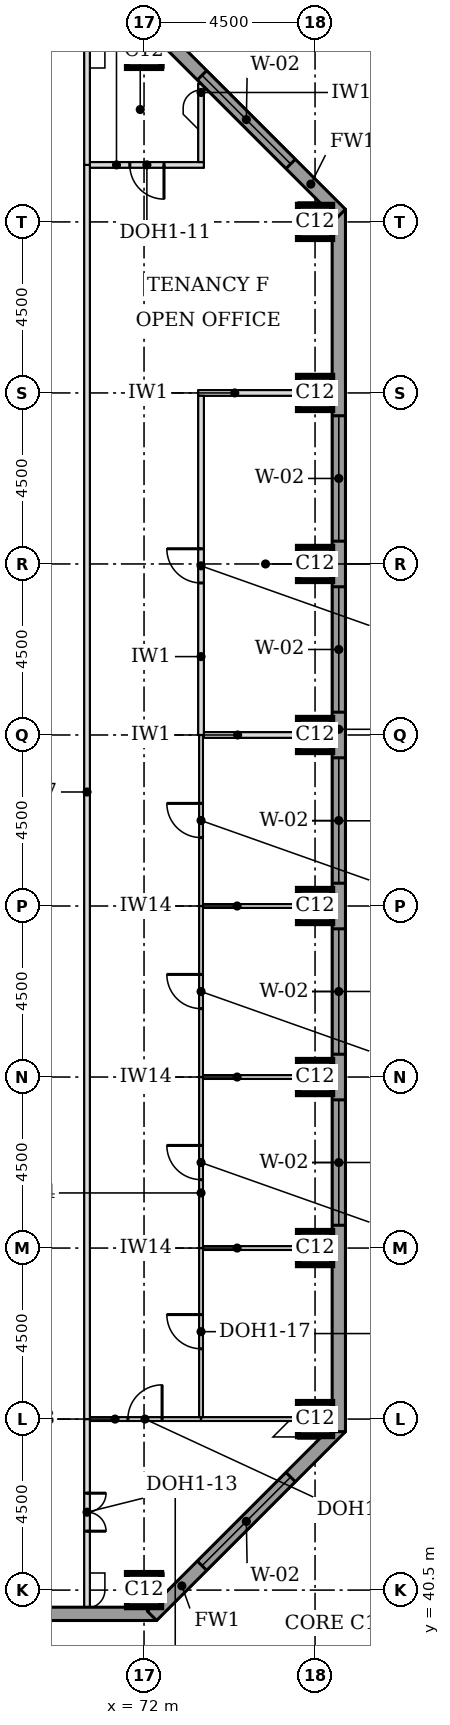
"""IFC4 building model, lengths in metres.
Left out: names, types, materials, properties, quantities, classifications, styles, units other than length and angle.
Written with IfcOpenShell. Run it as: python <this file> out.ifc"""

import sys

from ifc_helpers import new_model, si_unit, direction, frame, frame_2d, origin, origin_2d, place, context, subcontext, project, spatial, rectangle, extrude, element, fill, save


model = new_model("IFC4")
c1 = context("Model", 3, precision=1e-05, world=origin(), true_north=direction((0.0, 1.0)))
c2 = subcontext(c1, "Body", "Model", "MODEL_VIEW")
j1 = project(units=[si_unit("LENGTHUNIT", "METRE"), si_unit("PLANEANGLEUNIT", "RADIAN")], contexts=[c1])
p1 = place(None, origin())
s1 = spatial("IfcSite", under=j1, at=p1, CompositionType="ELEMENT")
p2 = place(p1, origin())
s2 = spatial("IfcBuilding", under=s1, at=p2, CompositionType="ELEMENT")
p3 = place(p2, frame((0.0, 0.0, 147.7)))
s3 = spatial("IfcBuildingStorey", under=s2, at=p3, CompositionType="ELEMENT", Elevation=147.7)
for number, where, z_axis, x_axis in (
    (1, (72.0, 40.5, 0.0), (0.0, 0.0, 1.0), (1.0, 0.0, 0.0)),
    (2, (76.5, 45.0, 0.0), (0.0, 0.0, 1.0), (1.0, 0.0, 0.0)),
    (3, (76.5, 49.5, 0.0), (0.0, 0.0, 1.0), (1.0, 0.0, 0.0)),
    (4, (76.5, 54.0, 0.0), (0.0, 0.0, 1.0), (1.0, 0.0, 0.0)),
    (5, (76.5, 58.5, 0.0), (0.0, 0.0, 1.0), (1.0, 0.0, 0.0)),
    (6, (76.5, 63.0, 0.0), (0.0, 0.0, 1.0), (1.0, 0.0, 0.0)),
    (7, (76.5, 67.5, 0.0), (0.0, 0.0, 1.0), (1.0, 0.0, 0.0)),
    (8, (76.5, 72.0, 0.0), (0.0, 0.0, 1.0), (1.0, 0.0, 0.0)),
    (9, (76.5, 76.5, 0.0), (0.0, 0.0, 1.0), (1.0, 0.0, 0.0)),
    (10, (72.0, 81.0, 0.0), (0.0, 0.0, 1.0), (1.0, 0.0, 0.0)),
):
    element("IfcColumn", number, at=place(p3, frame(where, z_axis=z_axis, x_axis=x_axis)), inside=s3, PredefinedType="COLUMN", context=c2, shape_type="SweptSolid", body=[
        extrude(rectangle(XDim=0.9, YDim=0.9, at=origin_2d()), origin(), (0.0, 0.0, 1.0), 3.7),
    ])
p4 = place(p3, frame((36.0, 39.875, 0.0), z_axis=(0.0, 0.0, 1.0), x_axis=(1.0, 0.0, 0.0)))
e11 = element("IfcWall", 11, at=p4, inside=s3, PredefinedType="STANDARD", context=c2, shape_type="SweptSolid", body=[
    extrude(rectangle(XDim=36.331, YDim=0.35, at=frame_2d((18.166, 0.0))), origin(), (0.0, 0.0, 1.0), 3.525),
])
p5 = place(p4, frame((5.1, 0.0, 0.9)))
e12 = element("IfcOpeningElement", 12, at=p5, cuts=e11, PredefinedType="OPENING", context=c2, shape_type="SweptSolid", body=[
    extrude(rectangle(XDim=3.3, YDim=1.9, at=frame_2d((1.65, 0.95))), frame((0.0, 0.185, 0.0), z_axis=(0.0, -1.0, 0.0), x_axis=(1.0, 0.0, 0.0)), (0.0, 0.0, 1.0), 0.37),
])
p6 = place(p4, frame((9.6, 0.0, 0.9)))
e13 = element("IfcOpeningElement", 13, at=p6, cuts=e11, PredefinedType="OPENING", context=c2, shape_type="SweptSolid", body=[
    extrude(rectangle(XDim=3.3, YDim=1.9, at=frame_2d((1.65, 0.95))), frame((0.0, 0.185, 0.0), z_axis=(0.0, -1.0, 0.0), x_axis=(1.0, 0.0, 0.0)), (0.0, 0.0, 1.0), 0.37),
])
p7 = place(p4, frame((14.1, 0.0, 0.9)))
e14 = element("IfcOpeningElement", 14, at=p7, cuts=e11, PredefinedType="OPENING", context=c2, shape_type="SweptSolid", body=[
    extrude(rectangle(XDim=3.3, YDim=1.9, at=frame_2d((1.65, 0.95))), frame((0.0, 0.185, 0.0), z_axis=(0.0, -1.0, 0.0), x_axis=(1.0, 0.0, 0.0)), (0.0, 0.0, 1.0), 0.37),
])
p8 = place(p4, frame((18.6, 0.0, 0.9)))
e15 = element("IfcOpeningElement", 15, at=p8, cuts=e11, PredefinedType="OPENING", context=c2, shape_type="SweptSolid", body=[
    extrude(rectangle(XDim=3.3, YDim=1.9, at=frame_2d((1.65, 0.95))), frame((0.0, 0.185, 0.0), z_axis=(0.0, -1.0, 0.0), x_axis=(1.0, 0.0, 0.0)), (0.0, 0.0, 1.0), 0.37),
])
p9 = place(p4, frame((23.1, 0.0, 0.9)))
e16 = element("IfcOpeningElement", 16, at=p9, cuts=e11, PredefinedType="OPENING", context=c2, shape_type="SweptSolid", body=[
    extrude(rectangle(XDim=3.3, YDim=1.9, at=frame_2d((1.65, 0.95))), frame((0.0, 0.185, 0.0), z_axis=(0.0, -1.0, 0.0), x_axis=(1.0, 0.0, 0.0)), (0.0, 0.0, 1.0), 0.37),
])
p10 = place(p4, frame((27.6, 0.0, 0.9)))
e17 = element("IfcOpeningElement", 17, at=p10, cuts=e11, PredefinedType="OPENING", context=c2, shape_type="SweptSolid", body=[
    extrude(rectangle(XDim=3.3, YDim=1.9, at=frame_2d((1.65, 0.95))), frame((0.0, 0.185, 0.0), z_axis=(0.0, -1.0, 0.0), x_axis=(1.0, 0.0, 0.0)), (0.0, 0.0, 1.0), 0.37),
])
p11 = place(p3, frame((72.208, 39.824, 0.0), z_axis=(0.0, 0.0, 1.0), x_axis=(0.707106781187, 0.707106781187, 0.0)))
e18 = element("IfcWall", 18, at=p11, inside=s3, PredefinedType="STANDARD", context=c2, shape_type="SweptSolid", body=[
    extrude(rectangle(XDim=7.027, YDim=0.35, at=frame_2d((3.513, 0.0))), origin(), (0.0, 0.0, 1.0), 3.525),
])
p12 = place(p11, frame((1.863, 0.0, 0.9)))
e19 = element("IfcOpeningElement", 19, at=p12, cuts=e18, PredefinedType="OPENING", context=c2, shape_type="SweptSolid", body=[
    extrude(rectangle(XDim=3.3, YDim=1.9, at=frame_2d((1.65, 0.95))), frame((0.0, 0.185, 0.0), z_axis=(0.0, -1.0, 0.0), x_axis=(1.0, 0.0, 0.0)), (0.0, 0.0, 1.0), 0.37),
])
p13 = place(p3, frame((77.125, 44.669, 0.0), z_axis=(0.0, 0.0, 1.0), x_axis=(0.0, 1.0, 0.0)))
e20 = element("IfcWall", 20, at=p13, inside=s3, PredefinedType="STANDARD", context=c2, shape_type="SweptSolid", body=[
    extrude(rectangle(XDim=32.163, YDim=0.35, at=frame_2d((16.081, 0.0))), origin(), (0.0, 0.0, 1.0), 3.525),
])
p14 = place(p13, frame((5.431, 0.0, 0.9)))
e21 = element("IfcOpeningElement", 21, at=p14, cuts=e20, PredefinedType="OPENING", context=c2, shape_type="SweptSolid", body=[
    extrude(rectangle(XDim=3.3, YDim=1.9, at=frame_2d((1.65, 0.95))), frame((0.0, 0.185, 0.0), z_axis=(0.0, -1.0, 0.0), x_axis=(1.0, 0.0, 0.0)), (0.0, 0.0, 1.0), 0.37),
])
p15 = place(p13, frame((9.931, 0.0, 0.9)))
e22 = element("IfcOpeningElement", 22, at=p15, cuts=e20, PredefinedType="OPENING", context=c2, shape_type="SweptSolid", body=[
    extrude(rectangle(XDim=3.3, YDim=1.9, at=frame_2d((1.65, 0.95))), frame((0.0, 0.185, 0.0), z_axis=(0.0, -1.0, 0.0), x_axis=(1.0, 0.0, 0.0)), (0.0, 0.0, 1.0), 0.37),
])
p16 = place(p13, frame((14.431, 0.0, 0.9)))
e23 = element("IfcOpeningElement", 23, at=p16, cuts=e20, PredefinedType="OPENING", context=c2, shape_type="SweptSolid", body=[
    extrude(rectangle(XDim=3.3, YDim=1.9, at=frame_2d((1.65, 0.95))), frame((0.0, 0.185, 0.0), z_axis=(0.0, -1.0, 0.0), x_axis=(1.0, 0.0, 0.0)), (0.0, 0.0, 1.0), 0.37),
])
p17 = place(p13, frame((18.931, 0.0, 0.9)))
e24 = element("IfcOpeningElement", 24, at=p17, cuts=e20, PredefinedType="OPENING", context=c2, shape_type="SweptSolid", body=[
    extrude(rectangle(XDim=3.3, YDim=1.9, at=frame_2d((1.65, 0.95))), frame((0.0, 0.185, 0.0), z_axis=(0.0, -1.0, 0.0), x_axis=(1.0, 0.0, 0.0)), (0.0, 0.0, 1.0), 0.37),
])
p18 = place(p13, frame((23.431, 0.0, 0.9)))
e25 = element("IfcOpeningElement", 25, at=p18, cuts=e20, PredefinedType="OPENING", context=c2, shape_type="SweptSolid", body=[
    extrude(rectangle(XDim=3.3, YDim=1.9, at=frame_2d((1.65, 0.95))), frame((0.0, 0.185, 0.0), z_axis=(0.0, -1.0, 0.0), x_axis=(1.0, 0.0, 0.0)), (0.0, 0.0, 1.0), 0.37),
])
p19 = place(p3, frame((77.176, 76.708, 0.0), z_axis=(0.0, 0.0, 1.0), x_axis=(-0.707106781187, 0.707106781187, 0.0)))
e26 = element("IfcWall", 26, at=p19, inside=s3, PredefinedType="STANDARD", context=c2, shape_type="SweptSolid", body=[
    extrude(rectangle(XDim=7.027, YDim=0.35, at=frame_2d((3.513, 0.0))), origin(), (0.0, 0.0, 1.0), 3.525),
])
p20 = place(p19, frame((1.863, 0.0, 0.9)))
e27 = element("IfcOpeningElement", 27, at=p20, cuts=e26, PredefinedType="OPENING", context=c2, shape_type="SweptSolid", body=[
    extrude(rectangle(XDim=3.3, YDim=1.9, at=frame_2d((1.65, 0.95))), frame((0.0, 0.185, 0.0), z_axis=(0.0, -1.0, 0.0), x_axis=(1.0, 0.0, 0.0)), (0.0, 0.0, 1.0), 0.37),
])
p21 = place(p3, frame((70.575, 45.0, 0.0), z_axis=(0.0, 0.0, 1.0), x_axis=(1.0, 0.0, 0.0)))
e28 = element("IfcWall", 28, at=p21, inside=s3, PredefinedType="PARTITIONING", context=c2, shape_type="SweptSolid", body=[
    extrude(rectangle(XDim=2.925, YDim=0.1, at=frame_2d((1.462, 0.0))), origin(), (0.0, 0.0, 1.0), 3.096),
])
p22 = place(p21, frame((1.0, 0.0, 0.0)))
e29 = element("IfcOpeningElement", 29, at=p22, cuts=e28, PredefinedType="OPENING", context=c2, shape_type="SweptSolid", body=[
    extrude(rectangle(XDim=0.9, YDim=2.1, at=frame_2d((0.45, 1.05))), frame((0.0, 0.06, 0.0), z_axis=(0.0, -1.0, 0.0), x_axis=(1.0, 0.0, 0.0)), (0.0, 0.0, 1.0), 0.12),
])
p23 = place(p3, frame((73.5, 45.0, 0.0), z_axis=(0.0, 0.0, 1.0), x_axis=(1.0, 0.0, 0.0)))
e30 = element("IfcWall", 30, at=p23, inside=s3, PredefinedType="PARTITIONING", context=c2, shape_type="SweptSolid", body=[
    extrude(rectangle(XDim=2.55, YDim=0.1, at=frame_2d((1.275, 0.0))), origin(), (0.0, 0.0, 1.0), 3.096),
])
for number, where, z_axis, x_axis in (
    (31, (73.55, 49.5, 0.0), (0.0, 0.0, 1.0), (1.0, 0.0, 0.0)),
    (32, (73.55, 54.0, 0.0), (0.0, 0.0, 1.0), (1.0, 0.0, 0.0)),
    (33, (73.55, 58.5, 0.0), (0.0, 0.0, 1.0), (1.0, 0.0, 0.0)),
):
    element("IfcWall", number, at=place(p3, frame(where, z_axis=z_axis, x_axis=x_axis)), inside=s3, PredefinedType="PARTITIONING", context=c2, shape_type="SweptSolid", body=[
        extrude(rectangle(XDim=3.4, YDim=0.1, at=frame_2d((1.7, 0.0))), origin(), (0.0, 0.0, 1.0), 3.55),
    ])
p24 = place(p3, frame((73.575, 63.0, 0.0), z_axis=(0.0, 0.0, 1.0), x_axis=(1.0, 0.0, 0.0)))
e34 = element("IfcWall", 34, at=p24, inside=s3, PredefinedType="PARTITIONING", context=c2, shape_type="SweptSolid", body=[
    extrude(rectangle(XDim=3.375, YDim=0.15, at=frame_2d((1.688, 0.0))), origin(), (0.0, 0.0, 1.0), 3.55),
])
p25 = place(p3, frame((73.425, 72.0, 0.0), z_axis=(0.0, 0.0, 1.0), x_axis=(1.0, 0.0, 0.0)))
e35 = element("IfcWall", 35, at=p25, inside=s3, PredefinedType="PARTITIONING", context=c2, shape_type="SweptSolid", body=[
    extrude(rectangle(XDim=3.525, YDim=0.15, at=frame_2d((1.762, 0.0))), origin(), (0.0, 0.0, 1.0), 3.55),
])
p26 = place(p3, frame((70.575, 78.0, 0.0), z_axis=(0.0, 0.0, 1.0), x_axis=(1.0, 0.0, 0.0)))
e36 = element("IfcWall", 36, at=p26, inside=s3, PredefinedType="PARTITIONING", context=c2, shape_type="SweptSolid", body=[
    extrude(rectangle(XDim=3.0, YDim=0.15, at=frame_2d((1.5, 0.0))), origin(), (0.0, 0.0, 1.0), 3.55),
])
p27 = place(p26, frame((1.05, 0.0, 0.0)))
e37 = element("IfcOpeningElement", 37, at=p27, cuts=e36, PredefinedType="OPENING", context=c2, shape_type="SweptSolid", body=[
    extrude(rectangle(XDim=0.9, YDim=2.1, at=frame_2d((0.45, 1.05))), frame((0.0, 0.085, 0.0), z_axis=(0.0, -1.0, 0.0), x_axis=(1.0, 0.0, 0.0)), (0.0, 0.0, 1.0), 0.17),
])
p28 = place(p3, frame((70.5, 40.05, 0.0), z_axis=(0.0, 0.0, 1.0), x_axis=(0.0, 1.0, 0.0)))
e38 = element("IfcWall", 38, at=p28, inside=s3, PredefinedType="PARTITIONING", context=c2, shape_type="SweptSolid", body=[
    extrude(rectangle(XDim=4.95, YDim=0.15, at=frame_2d((2.475, 0.0))), origin(), (0.0, 0.0, 1.0), 3.55),
])
p29 = place(p28, frame((2.0, 0.0, 0.0)))
e39 = element("IfcOpeningElement", 39, at=p29, cuts=e38, PredefinedType="OPENING", context=c2, shape_type="SweptSolid", body=[
    extrude(rectangle(XDim=1.0, YDim=2.1, at=frame_2d((0.5, 1.05))), frame((0.0, 0.085, 0.0), z_axis=(0.0, -1.0, 0.0), x_axis=(1.0, 0.0, 0.0)), (0.0, 0.0, 1.0), 0.17),
])
p30 = place(p3, frame((70.5, 45.0, 0.0), z_axis=(0.0, 0.0, 1.0), x_axis=(0.0, 1.0, 0.0)))
e40 = element("IfcWall", 40, at=p30, inside=s3, PredefinedType="PARTITIONING", context=c2, shape_type="SweptSolid", body=[
    extrude(rectangle(XDim=33.0, YDim=0.15, at=frame_2d((16.5, 0.0))), origin(), (0.0, 0.0, 1.0), 3.55),
])
p31 = place(p3, frame((73.5, 45.05, 0.0), z_axis=(0.0, 0.0, 1.0), x_axis=(0.0, 1.0, 0.0)))
e41 = element("IfcWall", 41, at=p31, inside=s3, PredefinedType="PARTITIONING", context=c2, shape_type="SweptSolid", body=[
    extrude(rectangle(XDim=4.45, YDim=0.1, at=frame_2d((2.225, 0.0))), origin(), (0.0, 0.0, 1.0), 3.55),
])
p32 = place(p31, frame((1.8, 0.0, 0.0)))
e42 = element("IfcOpeningElement", 42, at=p32, cuts=e41, PredefinedType="OPENING", context=c2, shape_type="SweptSolid", body=[
    extrude(rectangle(XDim=0.9, YDim=2.1, at=frame_2d((0.45, 1.05))), frame((0.0, 0.06, 0.0), z_axis=(0.0, -1.0, 0.0), x_axis=(1.0, 0.0, 0.0)), (0.0, 0.0, 1.0), 0.12),
])
p33 = place(p3, frame((73.5, 49.5, 0.0), z_axis=(0.0, 0.0, 1.0), x_axis=(0.0, 1.0, 0.0)))
e43 = element("IfcWall", 43, at=p33, inside=s3, PredefinedType="PARTITIONING", context=c2, shape_type="SweptSolid", body=[
    extrude(rectangle(XDim=4.5, YDim=0.1, at=frame_2d((2.25, 0.0))), origin(), (0.0, 0.0, 1.0), 3.55),
])
p34 = place(p33, frame((1.8, 0.0, 0.0)))
e44 = element("IfcOpeningElement", 44, at=p34, cuts=e43, PredefinedType="OPENING", context=c2, shape_type="SweptSolid", body=[
    extrude(rectangle(XDim=0.9, YDim=2.1, at=frame_2d((0.45, 1.05))), frame((0.0, 0.06, 0.0), z_axis=(0.0, -1.0, 0.0), x_axis=(1.0, 0.0, 0.0)), (0.0, 0.0, 1.0), 0.12),
])
p35 = place(p3, frame((73.5, 54.0, 0.0), z_axis=(0.0, 0.0, 1.0), x_axis=(0.0, 1.0, 0.0)))
e45 = element("IfcWall", 45, at=p35, inside=s3, PredefinedType="PARTITIONING", context=c2, shape_type="SweptSolid", body=[
    extrude(rectangle(XDim=4.5, YDim=0.1, at=frame_2d((2.25, 0.0))), origin(), (0.0, 0.0, 1.0), 3.55),
])
p36 = place(p35, frame((1.8, 0.0, 0.0)))
e46 = element("IfcOpeningElement", 46, at=p36, cuts=e45, PredefinedType="OPENING", context=c2, shape_type="SweptSolid", body=[
    extrude(rectangle(XDim=0.9, YDim=2.1, at=frame_2d((0.45, 1.05))), frame((0.0, 0.06, 0.0), z_axis=(0.0, -1.0, 0.0), x_axis=(1.0, 0.0, 0.0)), (0.0, 0.0, 1.0), 0.12),
])
p37 = place(p3, frame((73.5, 58.5, 0.0), z_axis=(0.0, 0.0, 1.0), x_axis=(0.0, 1.0, 0.0)))
e47 = element("IfcWall", 47, at=p37, inside=s3, PredefinedType="PARTITIONING", context=c2, shape_type="SweptSolid", body=[
    extrude(rectangle(XDim=4.5, YDim=0.1, at=frame_2d((2.25, 0.0))), origin(), (0.0, 0.0, 1.0), 3.55),
])
p38 = place(p37, frame((1.8, 0.0, 0.0)))
e48 = element("IfcOpeningElement", 48, at=p38, cuts=e47, PredefinedType="OPENING", context=c2, shape_type="SweptSolid", body=[
    extrude(rectangle(XDim=0.9, YDim=2.1, at=frame_2d((0.45, 1.05))), frame((0.0, 0.06, 0.0), z_axis=(0.0, -1.0, 0.0), x_axis=(1.0, 0.0, 0.0)), (0.0, 0.0, 1.0), 0.12),
])
p39 = place(p3, frame((73.5, 63.0, 0.0), z_axis=(0.0, 0.0, 1.0), x_axis=(0.0, 1.0, 0.0)))
e49 = element("IfcWall", 49, at=p39, inside=s3, PredefinedType="PARTITIONING", context=c2, shape_type="SweptSolid", body=[
    extrude(rectangle(XDim=8.925, YDim=0.15, at=frame_2d((4.462, 0.0))), origin(), (0.0, 0.0, 1.0), 3.55),
])
p40 = place(p39, frame((4.0, 0.0, 0.0)))
e50 = element("IfcOpeningElement", 50, at=p40, cuts=e49, PredefinedType="OPENING", context=c2, shape_type="SweptSolid", body=[
    extrude(rectangle(XDim=0.9, YDim=2.1, at=frame_2d((0.45, 1.05))), frame((0.0, 0.085, 0.0), z_axis=(0.0, -1.0, 0.0), x_axis=(1.0, 0.0, 0.0)), (0.0, 0.0, 1.0), 0.17),
])
p41 = place(p3, frame((70.5, 78.0, 0.0), z_axis=(0.0, 0.0, 1.0), x_axis=(0.0, 1.0, 0.0)))
e51 = element("IfcWall", 51, at=p41, inside=s3, PredefinedType="PARTITIONING", context=c2, shape_type="SweptSolid", body=[
    extrude(rectangle(XDim=3.45, YDim=0.15, at=frame_2d((1.725, 0.0))), origin(), (0.0, 0.0, 1.0), 3.55),
])
p42 = place(p3, frame((73.5, 78.075, 0.0), z_axis=(0.0, 0.0, 1.0), x_axis=(0.0, 1.0, 0.0)))
e52 = element("IfcWall", 52, at=p42, inside=s3, PredefinedType="PARTITIONING", context=c2, shape_type="SweptSolid", body=[
    extrude(rectangle(XDim=2.062, YDim=0.15, at=frame_2d((1.031, 0.0))), origin(), (0.0, 0.0, 1.0), 3.55),
])
p43 = place(p12, origin())
e53 = element("IfcWindow", 53, at=p43, inside=s3, PartitioningType="SINGLE_PANEL", PredefinedType="WINDOW", context=c2, shape_type="SweptSolid", body=[
    extrude(rectangle(XDim=3.3, YDim=1.9, at=frame_2d((1.65, 0.95))), frame((0.0, 0.085, 0.0), z_axis=(0.0, -1.0, 0.0), x_axis=(1.0, 0.0, 0.0)), (0.0, 0.0, 1.0), 0.06),
])
fill(e19, e53)
p44 = place(p14, origin())
e54 = element("IfcWindow", 54, at=p44, inside=s3, PartitioningType="SINGLE_PANEL", PredefinedType="WINDOW", context=c2, shape_type="SweptSolid", body=[
    extrude(rectangle(XDim=3.3, YDim=1.9, at=frame_2d((1.65, 0.95))), frame((0.0, 0.085, 0.0), z_axis=(0.0, -1.0, 0.0), x_axis=(1.0, 0.0, 0.0)), (0.0, 0.0, 1.0), 0.06),
])
fill(e21, e54)
p45 = place(p15, origin())
e55 = element("IfcWindow", 55, at=p45, inside=s3, PartitioningType="SINGLE_PANEL", PredefinedType="WINDOW", context=c2, shape_type="SweptSolid", body=[
    extrude(rectangle(XDim=3.3, YDim=1.9, at=frame_2d((1.65, 0.95))), frame((0.0, 0.085, 0.0), z_axis=(0.0, -1.0, 0.0), x_axis=(1.0, 0.0, 0.0)), (0.0, 0.0, 1.0), 0.06),
])
fill(e22, e55)
p46 = place(p16, origin())
e56 = element("IfcWindow", 56, at=p46, inside=s3, PartitioningType="SINGLE_PANEL", PredefinedType="WINDOW", context=c2, shape_type="SweptSolid", body=[
    extrude(rectangle(XDim=3.3, YDim=1.9, at=frame_2d((1.65, 0.95))), frame((0.0, 0.085, 0.0), z_axis=(0.0, -1.0, 0.0), x_axis=(1.0, 0.0, 0.0)), (0.0, 0.0, 1.0), 0.06),
])
fill(e23, e56)
p47 = place(p17, origin())
e57 = element("IfcWindow", 57, at=p47, inside=s3, PartitioningType="SINGLE_PANEL", PredefinedType="WINDOW", context=c2, shape_type="SweptSolid", body=[
    extrude(rectangle(XDim=3.3, YDim=1.9, at=frame_2d((1.65, 0.95))), frame((0.0, 0.085, 0.0), z_axis=(0.0, -1.0, 0.0), x_axis=(1.0, 0.0, 0.0)), (0.0, 0.0, 1.0), 0.06),
])
fill(e24, e57)
p48 = place(p18, origin())
e58 = element("IfcWindow", 58, at=p48, inside=s3, PartitioningType="SINGLE_PANEL", PredefinedType="WINDOW", context=c2, shape_type="SweptSolid", body=[
    extrude(rectangle(XDim=3.3, YDim=1.9, at=frame_2d((1.65, 0.95))), frame((0.0, 0.085, 0.0), z_axis=(0.0, -1.0, 0.0), x_axis=(1.0, 0.0, 0.0)), (0.0, 0.0, 1.0), 0.06),
])
fill(e25, e58)
p49 = place(p20, origin())
e59 = element("IfcWindow", 59, at=p49, inside=s3, PartitioningType="SINGLE_PANEL", PredefinedType="WINDOW", context=c2, shape_type="SweptSolid", body=[
    extrude(rectangle(XDim=3.3, YDim=1.9, at=frame_2d((1.65, 0.95))), frame((0.0, 0.085, 0.0), z_axis=(0.0, -1.0, 0.0), x_axis=(1.0, 0.0, 0.0)), (0.0, 0.0, 1.0), 0.06),
])
fill(e27, e59)
p50 = place(p29, frame((1.0, 0.0, 0.0), z_axis=(0.0, 0.0, 1.0), x_axis=(-1.0, 0.0, 0.0)))
e60 = element("IfcDoor", 60, at=p50, inside=s3, OperationType="DOUBLE_DOOR_SINGLE_SWING", PredefinedType="DOOR", context=c2, shape_type="SweptSolid", body=[
    extrude(rectangle(XDim=1.0, YDim=2.1, at=frame_2d((0.5, 1.05))), frame((0.0, 0.025, 0.0), z_axis=(0.0, -1.0, 0.0), x_axis=(1.0, 0.0, 0.0)), (0.0, 0.0, 1.0), 0.05),
])
fill(e39, e60)
p51 = place(p22, origin())
e61 = element("IfcDoor", 61, at=p51, inside=s3, OperationType="SINGLE_SWING_RIGHT", PredefinedType="DOOR", context=c2, shape_type="SweptSolid", body=[
    extrude(rectangle(XDim=0.9, YDim=2.1, at=frame_2d((0.45, 1.05))), frame((0.0, 0.025, 0.0), z_axis=(0.0, -1.0, 0.0), x_axis=(1.0, 0.0, 0.0)), (0.0, 0.0, 1.0), 0.05),
])
fill(e29, e61)
p52 = place(p32, origin())
e62 = element("IfcDoor", 62, at=p52, inside=s3, OperationType="SINGLE_SWING_RIGHT", PredefinedType="DOOR", context=c2, shape_type="SweptSolid", body=[
    extrude(rectangle(XDim=0.9, YDim=2.1, at=frame_2d((0.45, 1.05))), frame((0.0, 0.025, 0.0), z_axis=(0.0, -1.0, 0.0), x_axis=(1.0, 0.0, 0.0)), (0.0, 0.0, 1.0), 0.05),
])
fill(e42, e62)
p53 = place(p34, origin())
e63 = element("IfcDoor", 63, at=p53, inside=s3, OperationType="SINGLE_SWING_RIGHT", PredefinedType="DOOR", context=c2, shape_type="SweptSolid", body=[
    extrude(rectangle(XDim=0.9, YDim=2.1, at=frame_2d((0.45, 1.05))), frame((0.0, 0.025, 0.0), z_axis=(0.0, -1.0, 0.0), x_axis=(1.0, 0.0, 0.0)), (0.0, 0.0, 1.0), 0.05),
])
fill(e44, e63)
p54 = place(p36, origin())
e64 = element("IfcDoor", 64, at=p54, inside=s3, OperationType="SINGLE_SWING_RIGHT", PredefinedType="DOOR", context=c2, shape_type="SweptSolid", body=[
    extrude(rectangle(XDim=0.9, YDim=2.1, at=frame_2d((0.45, 1.05))), frame((0.0, 0.025, 0.0), z_axis=(0.0, -1.0, 0.0), x_axis=(1.0, 0.0, 0.0)), (0.0, 0.0, 1.0), 0.05),
])
fill(e46, e64)
p55 = place(p38, origin())
e65 = element("IfcDoor", 65, at=p55, inside=s3, OperationType="SINGLE_SWING_RIGHT", PredefinedType="DOOR", context=c2, shape_type="SweptSolid", body=[
    extrude(rectangle(XDim=0.9, YDim=2.1, at=frame_2d((0.45, 1.05))), frame((0.0, 0.025, 0.0), z_axis=(0.0, -1.0, 0.0), x_axis=(1.0, 0.0, 0.0)), (0.0, 0.0, 1.0), 0.05),
])
fill(e48, e65)
p56 = place(p27, frame((0.9, 0.0, 0.0), z_axis=(0.0, 0.0, 1.0), x_axis=(-1.0, 0.0, 0.0)))
e66 = element("IfcDoor", 66, at=p56, inside=s3, OperationType="SINGLE_SWING_LEFT", PredefinedType="DOOR", context=c2, shape_type="SweptSolid", body=[
    extrude(rectangle(XDim=0.9, YDim=2.1, at=frame_2d((0.45, 1.05))), frame((0.0, 0.025, 0.0), z_axis=(0.0, -1.0, 0.0), x_axis=(1.0, 0.0, 0.0)), (0.0, 0.0, 1.0), 0.05),
])
fill(e37, e66)
p57 = place(p40, origin())
e67 = element("IfcDoor", 67, at=p57, inside=s3, OperationType="SINGLE_SWING_RIGHT", PredefinedType="DOOR", context=c2, shape_type="SweptSolid", body=[
    extrude(rectangle(XDim=0.9, YDim=2.1, at=frame_2d((0.45, 1.05))), frame((0.0, 0.025, 0.0), z_axis=(0.0, -1.0, 0.0), x_axis=(1.0, 0.0, 0.0)), (0.0, 0.0, 1.0), 0.05),
])
fill(e50, e67)
save(model, sys.argv[1])
